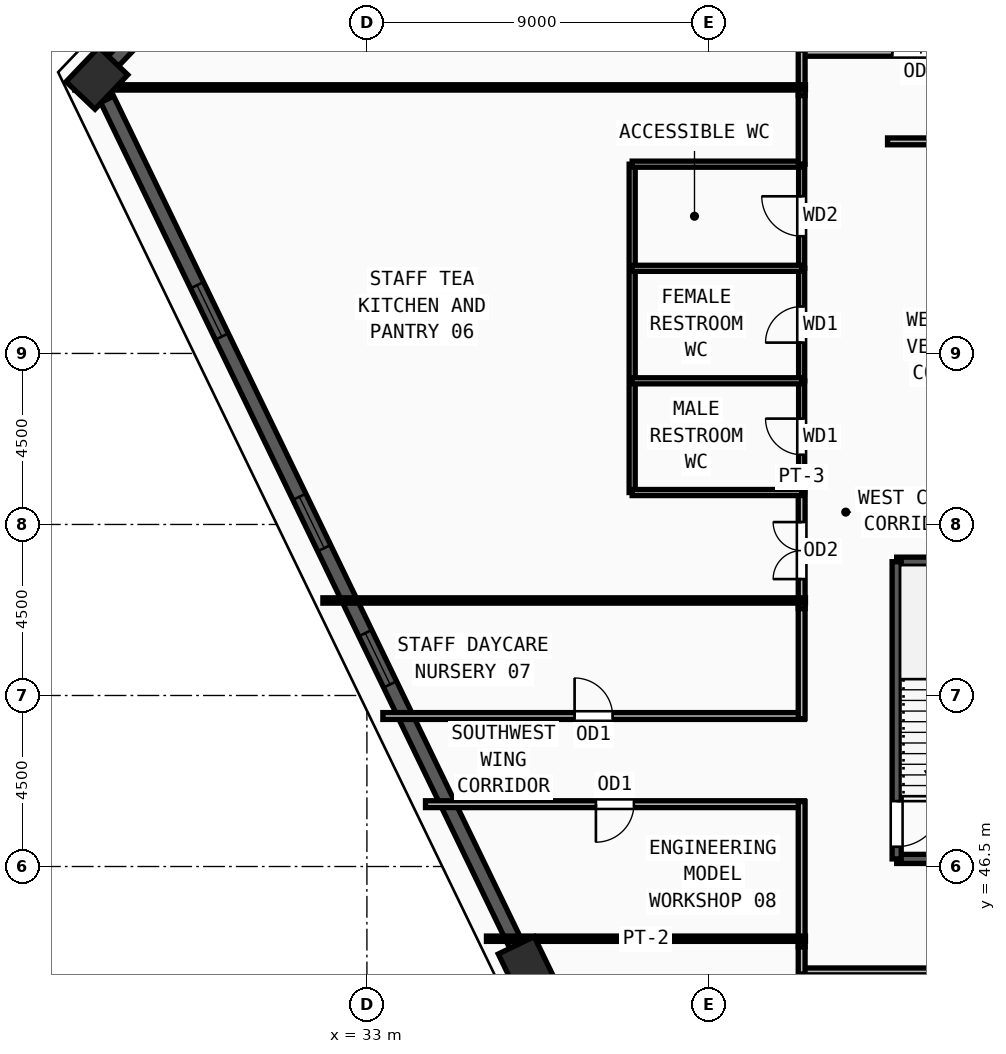
"""IFC4 building model, lengths in metres.
Left out: names, types, materials, properties, quantities, classifications, styles, units other than length and angle.
Written with IfcOpenShell. Run it as: python <this file> out.ifc"""

import sys

from ifc_helpers import new_model, si_unit, direction, frame, frame_2d, origin, origin_2d, place, context, subcontext, project, spatial, rectangle, extrude, source, transform, mapped, element, fill, save


model = new_model("IFC4")
c1 = context("Model", 3, precision=1e-05, world=origin(), true_north=direction((0.0, 1.0)))
c2 = subcontext(c1, "Body", "Model", "MODEL_VIEW")
j1 = project(units=[si_unit("LENGTHUNIT", "METRE"), si_unit("PLANEANGLEUNIT", "RADIAN")], contexts=[c1])
p1 = place(None, origin())
s1 = spatial("IfcSite", under=j1, at=p1, CompositionType="ELEMENT")
p2 = place(p1, origin())
s2 = spatial("IfcBuilding", under=s1, at=p2, CompositionType="ELEMENT")
p3 = place(p2, frame((0.0, 0.0, 194.25)))
s3 = spatial("IfcBuildingStorey", under=s2, at=p3, CompositionType="ELEMENT", Elevation=194.25)
m1 = source(origin(), c2, "Body", "SweptSolid", [
    extrude(rectangle(XDim=1.25, YDim=1.05, at=origin_2d()), origin(), (0.0, 0.0, 1.0), 3.75),
])
for number, where, z_axis, x_axis in (
    (1, (37.202, 43.864, 0.0), (0.0, 0.0, 1.0), (-0.435, 0.9, 0.0)),
    (2, (25.896, 67.241, 0.0), (0.0, 0.0, 1.0), (0.689, 0.724, 0.0)),
):
    element("IfcColumn", number, at=place(p3, frame(where, z_axis=z_axis, x_axis=x_axis)), inside=s3, PredefinedType="COLUMN", context=c2, shape_type="MappedRepresentation", body=[
        mapped(m1, transform((0.0, 0.0, 0.0), x_axis=(1.0, 0.0, 0.0), y_axis=(0.0, 1.0, 0.0), z_axis=(0.0, 0.0, 1.0), scale=1.0)),
    ])
p4 = place(p3, frame((29.433, 70.958, 0.0), z_axis=(0.0, 0.0, 1.0), x_axis=(-0.689291978765, -0.724483656137, 0.0)))
e3 = element("IfcWall", 3, at=p4, inside=s3, PredefinedType="SOLIDWALL", context=c2, shape_type="SweptSolid", body=[
    extrude(rectangle(XDim=4.516, YDim=0.38, at=frame_2d((2.258, 0.0))), origin(), (0.0, 0.0, 1.0), 3.57),
])
m2 = source(origin(), c2, "Body", "SweptSolid", [
    extrude(rectangle(XDim=1.2, YDim=1.9, at=frame_2d((0.6, 0.95))), frame((0.0, 0.2, 0.0), z_axis=(0.0, -1.0, 0.0), x_axis=(1.0, 0.0, 0.0)), (0.0, 0.0, 1.0), 0.4),
])
p5 = place(p4, frame((1.658, 0.0, 0.55)))
e4 = element("IfcOpeningElement", 4, at=p5, cuts=e3, PredefinedType="OPENING", context=c2, shape_type="MappedRepresentation", body=[
    mapped(m2, transform((0.0, 0.0, 0.0), x_axis=(1.0, 0.0, 0.0), y_axis=(0.0, 1.0, 0.0), z_axis=(0.0, 0.0, 1.0), scale=1.0)),
])
p6 = place(p3, frame((26.164, 66.687, 0.0), z_axis=(0.0, 0.0, 1.0), x_axis=(0.43538652966, -0.900243616912, 0.0)))
e5 = element("IfcWall", 5, at=p6, inside=s3, PredefinedType="SOLIDWALL", context=c2, shape_type="SweptSolid", body=[
    extrude(rectangle(XDim=24.737, YDim=0.38, at=frame_2d((12.368, 0.0))), origin(), (0.0, 0.0, 1.0), 3.57),
])
m3 = source(origin(), c2, "Body", "SweptSolid", [
    extrude(rectangle(XDim=1.5, YDim=1.9, at=frame_2d((0.75, 0.95))), frame((0.0, 0.2, 0.0), z_axis=(0.0, -1.0, 0.0), x_axis=(1.0, 0.0, 0.0)), (0.0, 0.0, 1.0), 0.4),
])
p7 = place(p6, frame((5.434, 0.0, 0.55)))
e6 = element("IfcOpeningElement", 6, at=p7, cuts=e5, PredefinedType="OPENING", context=c2, shape_type="MappedRepresentation", body=[
    mapped(m3, transform((0.0, 0.0, 0.0), x_axis=(1.0, 0.0, 0.0), y_axis=(0.0, 1.0, 0.0), z_axis=(0.0, 0.0, 1.0), scale=1.0)),
])
p8 = place(p6, frame((11.618, 0.0, 0.55)))
e7 = element("IfcOpeningElement", 7, at=p8, cuts=e5, PredefinedType="OPENING", context=c2, shape_type="MappedRepresentation", body=[
    mapped(m3, transform((0.0, 0.0, 0.0), x_axis=(1.0, 0.0, 0.0), y_axis=(0.0, 1.0, 0.0), z_axis=(0.0, 0.0, 1.0), scale=1.0)),
])
p9 = place(p6, frame((15.602, 0.0, 0.55)))
e8 = element("IfcOpeningElement", 8, at=p9, cuts=e5, PredefinedType="OPENING", context=c2, shape_type="MappedRepresentation", body=[
    mapped(m3, transform((0.0, 0.0, 0.0), x_axis=(1.0, 0.0, 0.0), y_axis=(0.0, 1.0, 0.0), z_axis=(0.0, 0.0, 1.0), scale=1.0)),
])
for number, where, z_axis, x_axis in (
    (9, (46.94, 46.7, 0.0), (0.0, 0.0, 1.0), (1.0, 0.0, 0.0)),
    (10, (50.38, 54.52, 0.0), (0.0, 0.0, 1.0), (-1.0, 0.0, 0.0)),
):
    element("IfcWall", number, at=place(p3, frame(where, z_axis=z_axis, x_axis=x_axis)), inside=s3, PredefinedType="SOLIDWALL", context=c2, shape_type="SweptSolid", body=[
        extrude(rectangle(XDim=3.44, YDim=0.24, at=frame_2d((1.72, 0.0))), origin(), (0.0, 0.0, 1.0), 3.57),
    ])
p10 = place(p3, frame((46.94, 54.52, 0.0), z_axis=(0.0, 0.0, 1.0), x_axis=(0.0, -1.0, 0.0)))
e11 = element("IfcWall", 11, at=p10, inside=s3, PredefinedType="SOLIDWALL", context=c2, shape_type="SweptSolid", body=[
    extrude(rectangle(XDim=7.82, YDim=0.24, at=frame_2d((3.91, 0.0))), origin(), (0.0, 0.0, 1.0), 3.57),
])
m4 = source(origin(), c2, "Body", "SweptSolid", [
    extrude(rectangle(XDim=1.2, YDim=2.2, at=frame_2d((0.6, 1.1))), frame((0.0, 0.13, 0.0), z_axis=(0.0, -1.0, 0.0), x_axis=(1.0, 0.0, 0.0)), (0.0, 0.0, 1.0), 0.26),
])
p11 = place(p10, frame((6.3, 0.0, 0.0)))
e12 = element("IfcOpeningElement", 12, at=p11, cuts=e11, PredefinedType="OPENING", context=c2, shape_type="MappedRepresentation", body=[
    mapped(m4, transform((0.0, 0.0, 0.0), x_axis=(1.0, 0.0, 0.0), y_axis=(0.0, 1.0, 0.0), z_axis=(0.0, 0.0, 1.0), scale=1.0)),
])
p12 = place(p3, frame((44.44, 56.34, 0.0), z_axis=(0.0, 0.0, 1.0), x_axis=(0.0, 1.0, 0.0)))
e13 = element("IfcWall", 13, at=p12, inside=s3, PredefinedType="PARTITIONING", context=c2, shape_type="SweptSolid", body=[
    extrude(rectangle(XDim=2.94, YDim=0.16, at=frame_2d((1.47, 0.0))), origin(), (0.0, 0.0, 1.0), 3.57),
])
m5 = source(origin(), c2, "Body", "SweptSolid", [
    extrude(rectangle(XDim=0.95, YDim=2.15, at=frame_2d((0.475, 1.075))), frame((0.0, 0.09, 0.0), z_axis=(0.0, -1.0, 0.0), x_axis=(1.0, 0.0, 0.0)), (0.0, 0.0, 1.0), 0.18),
])
p13 = place(p12, frame((0.995, 0.0, 0.0)))
e14 = element("IfcOpeningElement", 14, at=p13, cuts=e13, PredefinedType="OPENING", context=c2, shape_type="MappedRepresentation", body=[
    mapped(m5, transform((0.0, 0.0, 0.0), x_axis=(1.0, 0.0, 0.0), y_axis=(0.0, 1.0, 0.0), z_axis=(0.0, 0.0, 1.0), scale=1.0)),
])
p14 = place(p3, frame((44.44, 59.28, 0.0), z_axis=(0.0, 0.0, 1.0), x_axis=(0.0, 1.0, 0.0)))
e15 = element("IfcWall", 15, at=p14, inside=s3, PredefinedType="PARTITIONING", context=c2, shape_type="SweptSolid", body=[
    extrude(rectangle(XDim=2.96, YDim=0.16, at=frame_2d((1.48, 0.0))), origin(), (0.0, 0.0, 1.0), 3.57),
])
p15 = place(p14, frame((1.005, 0.0, 0.0)))
e16 = element("IfcOpeningElement", 16, at=p15, cuts=e15, PredefinedType="OPENING", context=c2, shape_type="MappedRepresentation", body=[
    mapped(m5, transform((0.0, 0.0, 0.0), x_axis=(1.0, 0.0, 0.0), y_axis=(0.0, 1.0, 0.0), z_axis=(0.0, 0.0, 1.0), scale=1.0)),
])
p16 = place(p3, frame((44.44, 62.24, 0.0), z_axis=(0.0, 0.0, 1.0), x_axis=(0.0, 1.0, 0.0)))
e17 = element("IfcWall", 17, at=p16, inside=s3, PredefinedType="PARTITIONING", context=c2, shape_type="SweptSolid", body=[
    extrude(rectangle(XDim=2.74, YDim=0.16, at=frame_2d((1.37, 0.0))), origin(), (0.0, 0.0, 1.0), 3.57),
])
m6 = source(origin(), c2, "Body", "SweptSolid", [
    extrude(rectangle(XDim=1.05, YDim=2.15, at=frame_2d((0.525, 1.075))), frame((0.0, 0.09, 0.0), z_axis=(0.0, -1.0, 0.0), x_axis=(1.0, 0.0, 0.0)), (0.0, 0.0, 1.0), 0.18),
])
p17 = place(p16, frame((0.845, 0.0, 0.0)))
e18 = element("IfcOpeningElement", 18, at=p17, cuts=e17, PredefinedType="OPENING", context=c2, shape_type="MappedRepresentation", body=[
    mapped(m6, transform((0.0, 0.0, 0.0), x_axis=(1.0, 0.0, 0.0), y_axis=(0.0, 1.0, 0.0), z_axis=(0.0, 0.0, 1.0), scale=1.0)),
])
p18 = place(p3, frame((46.7, 65.58, 0.0), z_axis=(0.0, 0.0, 1.0), x_axis=(1.0, 0.0, 0.0)))
e19 = element("IfcWall", 19, at=p18, inside=s3, PredefinedType="PARTITIONING", context=c2, shape_type="SweptSolid", body=[
    extrude(rectangle(XDim=3.84, YDim=0.18, at=frame_2d((1.92, 0.0))), origin(), (0.0, 0.0, 1.0), 3.57),
])
m7 = source(origin(), c2, "Body", "SweptSolid", [
    extrude(rectangle(XDim=1.3, YDim=2.2, at=frame_2d((0.65, 1.1))), frame((0.0, 0.1, 0.0), z_axis=(0.0, -1.0, 0.0), x_axis=(1.0, 0.0, 0.0)), (0.0, 0.0, 1.0), 0.2),
])
p19 = place(p18, frame((1.27, 0.0, 0.0)))
e20 = element("IfcOpeningElement", 20, at=p19, cuts=e19, PredefinedType="OPENING", context=c2, shape_type="MappedRepresentation", body=[
    mapped(m7, transform((0.0, 0.0, 0.0), x_axis=(1.0, 0.0, 0.0), y_axis=(0.0, 1.0, 0.0), z_axis=(0.0, 0.0, 1.0), scale=1.0)),
])
p20 = place(p3, frame((44.37, 67.91, 0.0), z_axis=(0.0, 0.0, 1.0), x_axis=(1.0, 0.0, 0.0)))
e21 = element("IfcWall", 21, at=p20, inside=s3, PredefinedType="PARTITIONING", context=c2, shape_type="SweptSolid", body=[
    extrude(rectangle(XDim=6.415, YDim=0.18, at=frame_2d((3.208, 0.0))), origin(), (0.0, 0.0, 1.0), 3.57),
])
m8 = source(origin(), c2, "Body", "SweptSolid", [
    extrude(rectangle(XDim=1.5, YDim=2.2, at=frame_2d((0.75, 1.1))), frame((0.0, 0.1, 0.0), z_axis=(0.0, -1.0, 0.0), x_axis=(1.0, 0.0, 0.0)), (0.0, 0.0, 1.0), 0.2),
])
p21 = place(p20, frame((2.457, 0.0, 0.0)))
e22 = element("IfcOpeningElement", 22, at=p21, cuts=e21, PredefinedType="OPENING", context=c2, shape_type="MappedRepresentation", body=[
    mapped(m8, transform((0.0, 0.0, 0.0), x_axis=(1.0, 0.0, 0.0), y_axis=(0.0, 1.0, 0.0), z_axis=(0.0, 0.0, 1.0), scale=1.0)),
])
p22 = place(p3, frame((44.44, 53.285, 0.0), z_axis=(0.0, 0.0, 1.0), x_axis=(0.0, 1.0, 0.0)))
e23 = element("IfcWall", 23, at=p22, inside=s3, PredefinedType="PARTITIONING", context=c2, shape_type="SweptSolid", body=[
    extrude(rectangle(XDim=3.055, YDim=0.18, at=frame_2d((1.528, 0.0))), origin(), (0.0, 0.0, 1.0), 3.57),
])
p23 = place(p22, frame((0.778, 0.0, 0.0)))
e24 = element("IfcOpeningElement", 24, at=p23, cuts=e23, PredefinedType="OPENING", context=c2, shape_type="MappedRepresentation", body=[
    mapped(m8, transform((0.0, 0.0, 0.0), x_axis=(1.0, 0.0, 0.0), y_axis=(0.0, 1.0, 0.0), z_axis=(0.0, 0.0, 1.0), scale=1.0)),
])
p24 = place(p3, frame((33.42, 50.46, 0.0), z_axis=(0.0, 0.0, 1.0), x_axis=(1.0, 0.0, 0.0)))
e25 = element("IfcWall", 25, at=p24, inside=s3, PredefinedType="PARTITIONING", context=c2, shape_type="SweptSolid", body=[
    extrude(rectangle(XDim=11.09, YDim=0.18, at=frame_2d((5.545, 0.0))), origin(), (0.0, 0.0, 1.0), 3.57),
])
m9 = source(origin(), c2, "Body", "SweptSolid", [
    extrude(rectangle(XDim=1.0, YDim=2.2, at=frame_2d((0.5, 1.1))), frame((0.0, 0.1, 0.0), z_axis=(0.0, -1.0, 0.0), x_axis=(1.0, 0.0, 0.0)), (0.0, 0.0, 1.0), 0.2),
])
p25 = place(p24, frame((5.045, 0.0, 0.0)))
e26 = element("IfcOpeningElement", 26, at=p25, cuts=e25, PredefinedType="OPENING", context=c2, shape_type="MappedRepresentation", body=[
    mapped(m9, transform((0.0, 0.0, 0.0), x_axis=(1.0, 0.0, 0.0), y_axis=(0.0, 1.0, 0.0), z_axis=(0.0, 0.0, 1.0), scale=1.0)),
])
p26 = place(p3, frame((44.51, 48.14, 0.0), z_axis=(0.0, 0.0, 1.0), x_axis=(-1.0, 0.0, 0.0)))
e27 = element("IfcWall", 27, at=p26, inside=s3, PredefinedType="PARTITIONING", context=c2, shape_type="SweptSolid", body=[
    extrude(rectangle(XDim=9.968, YDim=0.18, at=frame_2d((4.984, 0.0))), origin(), (0.0, 0.0, 1.0), 3.57),
])
p27 = place(p26, frame((4.484, 0.0, 0.0)))
e28 = element("IfcOpeningElement", 28, at=p27, cuts=e27, PredefinedType="OPENING", context=c2, shape_type="MappedRepresentation", body=[
    mapped(m9, transform((0.0, 0.0, 0.0), x_axis=(1.0, 0.0, 0.0), y_axis=(0.0, 1.0, 0.0), z_axis=(0.0, 0.0, 1.0), scale=1.0)),
])
p28 = place(p3, frame((55.215, 43.74, 0.0), z_axis=(0.0, 0.0, 1.0), x_axis=(-1.0, 0.0, 0.0)))
e29 = element("IfcWall", 29, at=p28, inside=s3, PredefinedType="PARTITIONING", context=c2, shape_type="SweptSolid", body=[
    extrude(rectangle(XDim=10.845, YDim=0.18, at=frame_2d((5.422, 0.0))), origin(), (0.0, 0.0, 1.0), 3.57),
])
p29 = place(p28, frame((4.673, 0.0, 0.0)))
e30 = element("IfcOpeningElement", 30, at=p29, cuts=e29, PredefinedType="OPENING", context=c2, shape_type="MappedRepresentation", body=[
    mapped(m8, transform((0.0, 0.0, 0.0), x_axis=(1.0, 0.0, 0.0), y_axis=(0.0, 1.0, 0.0), z_axis=(0.0, 0.0, 1.0), scale=1.0)),
])
p30 = place(p3, frame((39.98, 56.34, 0.0), z_axis=(0.0, 0.0, 1.0), x_axis=(0.0, 1.0, 0.0)))
e31 = element("IfcWall", 31, at=p30, inside=s3, PredefinedType="PARTITIONING", context=c2, shape_type="SweptSolid", body=[
    extrude(rectangle(XDim=8.64, YDim=0.16, at=frame_2d((4.32, 0.0))), origin(), (0.0, 0.0, 1.0), 3.57),
])
for number, where, z_axis, x_axis in (
    (32, (39.98, 56.34, 0.0), (0.0, 0.0, 1.0), (1.0, 0.0, 0.0)),
    (33, (39.98, 59.28, 0.0), (0.0, 0.0, 1.0), (1.0, 0.0, 0.0)),
    (34, (39.98, 62.24, 0.0), (0.0, 0.0, 1.0), (1.0, 0.0, 0.0)),
    (35, (39.98, 64.98, 0.0), (0.0, 0.0, 1.0), (1.0, 0.0, 0.0)),
):
    element("IfcWall", number, at=place(p3, frame(where, z_axis=z_axis, x_axis=x_axis)), inside=s3, PredefinedType="PARTITIONING", context=c2, shape_type="SweptSolid", body=[
        extrude(rectangle(XDim=4.46, YDim=0.16, at=frame_2d((2.23, 0.0))), origin(), (0.0, 0.0, 1.0), 3.57),
    ])
p31 = place(p3, frame((44.44, 66.785, 0.0), z_axis=(0.0, 0.0, 1.0), x_axis=(0.0, 1.0, 0.0)))
e36 = element("IfcWall", 36, at=p31, inside=s3, PredefinedType="PARTITIONING", context=c2, shape_type="SweptSolid", body=[
    extrude(rectangle(XDim=1.195, YDim=0.18, at=frame_2d((0.598, 0.0))), origin(), (0.0, 0.0, 1.0), 3.57),
])
p32 = place(p3, frame((44.44, 64.98, 0.0), z_axis=(0.0, 0.0, 1.0), x_axis=(0.0, 1.0, 0.0)))
e37 = element("IfcWall", 37, at=p32, inside=s3, PredefinedType="PARTITIONING", context=c2, shape_type="SweptSolid", body=[
    extrude(rectangle(XDim=1.805, YDim=0.18, at=frame_2d((0.902, 0.0))), origin(), (0.0, 0.0, 1.0), 3.57),
])
p33 = place(p3, frame((44.44, 50.39, 0.0), z_axis=(0.0, 0.0, 1.0), x_axis=(0.0, 1.0, 0.0)))
e38 = element("IfcWall", 38, at=p33, inside=s3, PredefinedType="PARTITIONING", context=c2, shape_type="SweptSolid", body=[
    extrude(rectangle(XDim=2.895, YDim=0.18, at=frame_2d((1.448, 0.0))), origin(), (0.0, 0.0, 1.0), 3.57),
])
p34 = place(p3, frame((44.44, 44.385, 0.0), z_axis=(0.0, 0.0, 1.0), x_axis=(0.0, 1.0, 0.0)))
e39 = element("IfcWall", 39, at=p34, inside=s3, PredefinedType="PARTITIONING", context=c2, shape_type="SweptSolid", body=[
    extrude(rectangle(XDim=3.825, YDim=0.18, at=frame_2d((1.913, 0.0))), origin(), (0.0, 0.0, 1.0), 3.205),
])
p35 = place(p3, frame((44.44, 43.67, 0.0), z_axis=(0.0, 0.0, 1.0), x_axis=(0.0, 1.0, 0.0)))
e40 = element("IfcWall", 40, at=p35, inside=s3, PredefinedType="PARTITIONING", context=c2, shape_type="SweptSolid", body=[
    extrude(rectangle(XDim=0.715, YDim=0.18, at=frame_2d((0.357, 0.0))), origin(), (0.0, 0.0, 1.0), 3.57),
])
p36 = place(p3, frame((44.54, 44.6, 0.0), z_axis=(0.0, 0.0, 1.0), x_axis=(-1.0, 0.0, 0.0)))
e41 = element("IfcWall", 41, at=p36, inside=s3, PredefinedType="PARTITIONING", context=c2, shape_type="SweptSolid", body=[
    extrude(rectangle(XDim=8.394, YDim=0.14, at=frame_2d((4.197, 0.0))), origin(), (0.0, 0.0, 1.0), 3.57),
])
p37 = place(p3, frame((44.54, 53.5, 0.0), z_axis=(0.0, 0.0, 1.0), x_axis=(-1.0, 0.0, 0.0)))
e42 = element("IfcWall", 42, at=p37, inside=s3, PredefinedType="PARTITIONING", context=c2, shape_type="SweptSolid", body=[
    extrude(rectangle(XDim=12.698, YDim=0.14, at=frame_2d((6.349, 0.0))), origin(), (0.0, 0.0, 1.0), 3.57),
])
p38 = place(p3, frame((44.54, 67.0, 0.0), z_axis=(0.0, 0.0, 1.0), x_axis=(-1.0, 0.0, 0.0)))
e43 = element("IfcWall", 43, at=p38, inside=s3, PredefinedType="PARTITIONING", context=c2, shape_type="SweptSolid", body=[
    extrude(rectangle(XDim=19.227, YDim=0.14, at=frame_2d((9.614, 0.0))), origin(), (0.0, 0.0, 1.0), 2.855),
])
m10 = source(origin(), c2, "Body", "SweptSolid", [
    extrude(rectangle(XDim=1.5, YDim=1.9, at=frame_2d((0.75, 0.95))), frame((0.0, 0.03, 0.0), z_axis=(0.0, -1.0, 0.0), x_axis=(1.0, 0.0, 0.0)), (0.0, 0.0, 1.0), 0.06),
])
p39 = place(p7, origin())
e44 = element("IfcWindow", 44, at=p39, inside=s3, PartitioningType="DOUBLE_PANEL_VERTICAL", PredefinedType="WINDOW", context=c2, shape_type="MappedRepresentation", body=[
    mapped(m10, transform((0.0, 0.0, 0.0), x_axis=(1.0, 0.0, 0.0), y_axis=(0.0, 1.0, 0.0), z_axis=(0.0, 0.0, 1.0), scale=1.0)),
])
fill(e6, e44)
p40 = place(p8, origin())
e45 = element("IfcWindow", 45, at=p40, inside=s3, PartitioningType="DOUBLE_PANEL_VERTICAL", PredefinedType="WINDOW", context=c2, shape_type="MappedRepresentation", body=[
    mapped(m10, transform((0.0, 0.0, 0.0), x_axis=(1.0, 0.0, 0.0), y_axis=(0.0, 1.0, 0.0), z_axis=(0.0, 0.0, 1.0), scale=1.0)),
])
fill(e7, e45)
p41 = place(p9, origin())
e46 = element("IfcWindow", 46, at=p41, inside=s3, PartitioningType="DOUBLE_PANEL_VERTICAL", PredefinedType="WINDOW", context=c2, shape_type="MappedRepresentation", body=[
    mapped(m10, transform((0.0, 0.0, 0.0), x_axis=(1.0, 0.0, 0.0), y_axis=(0.0, 1.0, 0.0), z_axis=(0.0, 0.0, 1.0), scale=1.0)),
])
fill(e8, e46)
m11 = source(origin(), c2, "Body", "SweptSolid", [
    extrude(rectangle(XDim=1.2, YDim=2.2, at=frame_2d((0.6, 1.1))), frame((0.0, 0.025, 0.0), z_axis=(0.0, -1.0, 0.0), x_axis=(1.0, 0.0, 0.0)), (0.0, 0.0, 1.0), 0.05),
])
p42 = place(p11, origin())
e47 = element("IfcDoor", 47, at=p42, inside=s3, OperationType="SINGLE_SWING_LEFT", PredefinedType="DOOR", context=c2, shape_type="MappedRepresentation", body=[
    mapped(m11, transform((0.0, 0.0, 0.0), x_axis=(1.0, 0.0, 0.0), y_axis=(0.0, 1.0, 0.0), z_axis=(0.0, 0.0, 1.0), scale=1.0)),
])
fill(e12, e47)
m12 = source(origin(), c2, "Body", "SweptSolid", [
    extrude(rectangle(XDim=0.95, YDim=2.15, at=frame_2d((0.475, 1.075))), frame((0.0, 0.025, 0.0), z_axis=(0.0, -1.0, 0.0), x_axis=(1.0, 0.0, 0.0)), (0.0, 0.0, 1.0), 0.05),
])
p43 = place(p13, origin())
e48 = element("IfcDoor", 48, at=p43, inside=s3, OperationType="SINGLE_SWING_RIGHT", PredefinedType="DOOR", context=c2, shape_type="MappedRepresentation", body=[
    mapped(m12, transform((0.0, 0.0, 0.0), x_axis=(1.0, 0.0, 0.0), y_axis=(0.0, 1.0, 0.0), z_axis=(0.0, 0.0, 1.0), scale=1.0)),
])
fill(e14, e48)
p44 = place(p15, origin())
e49 = element("IfcDoor", 49, at=p44, inside=s3, OperationType="SINGLE_SWING_LEFT", PredefinedType="DOOR", context=c2, shape_type="MappedRepresentation", body=[
    mapped(m12, transform((0.0, 0.0, 0.0), x_axis=(1.0, 0.0, 0.0), y_axis=(0.0, 1.0, 0.0), z_axis=(0.0, 0.0, 1.0), scale=1.0)),
])
fill(e16, e49)
m13 = source(origin(), c2, "Body", "SweptSolid", [
    extrude(rectangle(XDim=1.05, YDim=2.15, at=frame_2d((0.525, 1.075))), frame((0.0, 0.025, 0.0), z_axis=(0.0, -1.0, 0.0), x_axis=(1.0, 0.0, 0.0)), (0.0, 0.0, 1.0), 0.05),
])
p45 = place(p17, origin())
e50 = element("IfcDoor", 50, at=p45, inside=s3, OperationType="SINGLE_SWING_RIGHT", PredefinedType="DOOR", context=c2, shape_type="MappedRepresentation", body=[
    mapped(m13, transform((0.0, 0.0, 0.0), x_axis=(1.0, 0.0, 0.0), y_axis=(0.0, 1.0, 0.0), z_axis=(0.0, 0.0, 1.0), scale=1.0)),
])
fill(e18, e50)
m14 = source(origin(), c2, "Body", "SweptSolid", [
    extrude(rectangle(XDim=1.5, YDim=2.2, at=frame_2d((0.75, 1.1))), frame((0.0, 0.025, 0.0), z_axis=(0.0, -1.0, 0.0), x_axis=(1.0, 0.0, 0.0)), (0.0, 0.0, 1.0), 0.05),
])
p46 = place(p21, origin())
e51 = element("IfcDoor", 51, at=p46, inside=s3, OperationType="DOUBLE_DOOR_SINGLE_SWING", PredefinedType="DOOR", context=c2, shape_type="MappedRepresentation", body=[
    mapped(m14, transform((0.0, 0.0, 0.0), x_axis=(1.0, 0.0, 0.0), y_axis=(0.0, 1.0, 0.0), z_axis=(0.0, 0.0, 1.0), scale=1.0)),
])
fill(e22, e51)
p47 = place(p23, origin())
e52 = element("IfcDoor", 52, at=p47, inside=s3, OperationType="DOUBLE_DOOR_SINGLE_SWING", PredefinedType="DOOR", context=c2, shape_type="MappedRepresentation", body=[
    mapped(m14, transform((0.0, 0.0, 0.0), x_axis=(1.0, 0.0, 0.0), y_axis=(0.0, 1.0, 0.0), z_axis=(0.0, 0.0, 1.0), scale=1.0)),
])
fill(e24, e52)
m15 = source(origin(), c2, "Body", "SweptSolid", [
    extrude(rectangle(XDim=1.0, YDim=2.2, at=frame_2d((0.5, 1.1))), frame((0.0, 0.025, 0.0), z_axis=(0.0, -1.0, 0.0), x_axis=(1.0, 0.0, 0.0)), (0.0, 0.0, 1.0), 0.05),
])
p48 = place(p25, origin())
e53 = element("IfcDoor", 53, at=p48, inside=s3, OperationType="SINGLE_SWING_LEFT", PredefinedType="DOOR", context=c2, shape_type="MappedRepresentation", body=[
    mapped(m15, transform((0.0, 0.0, 0.0), x_axis=(1.0, 0.0, 0.0), y_axis=(0.0, 1.0, 0.0), z_axis=(0.0, 0.0, 1.0), scale=1.0)),
])
fill(e26, e53)
p49 = place(p27, origin())
e54 = element("IfcDoor", 54, at=p49, inside=s3, OperationType="SINGLE_SWING_RIGHT", PredefinedType="DOOR", context=c2, shape_type="MappedRepresentation", body=[
    mapped(m15, transform((0.0, 0.0, 0.0), x_axis=(1.0, 0.0, 0.0), y_axis=(0.0, 1.0, 0.0), z_axis=(0.0, 0.0, 1.0), scale=1.0)),
])
fill(e28, e54)
save(model, sys.argv[1])
